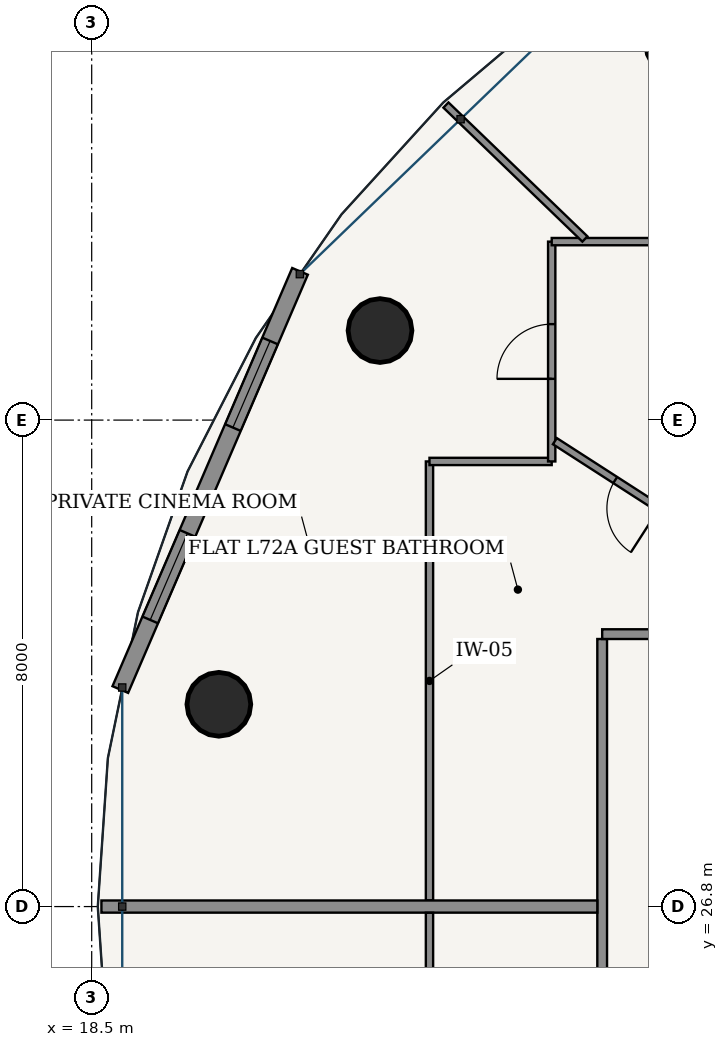
"""IFC4 building model, lengths in metres.
Left out: names, types, materials, properties, quantities, classifications, styles, units other than length and angle.
Written with IfcOpenShell. Run it as: python <this file> out.ifc"""

import sys

from ifc_helpers import new_model, si_unit, direction, frame, frame_2d, origin, origin_2d, place, context, subcontext, project, spatial, rectangle, hollow_circle, extrude, source, transform, mapped, element, fill, save


model = new_model("IFC4")
c1 = context("Model", 3, precision=1e-05, world=origin(), true_north=direction((-0.2419218956, 0.970295726276)))
c2 = subcontext(c1, "Body", "Model", "MODEL_VIEW")
j1 = project(units=[si_unit("LENGTHUNIT", "METRE"), si_unit("PLANEANGLEUNIT", "RADIAN")], contexts=[c1])
p1 = place(None, origin())
s1 = spatial("IfcSite", under=j1, at=p1, CompositionType="ELEMENT")
p2 = place(p1, origin())
s2 = spatial("IfcBuilding", under=s1, at=p2, CompositionType="ELEMENT")
p3 = place(p2, frame((0.0, 0.0, 274.45)))
s3 = spatial("IfcBuildingStorey", under=s2, at=p3, CompositionType="ELEMENT", Elevation=274.45)
for number, where, z_axis, x_axis in (
    (1, (28.139, 40.977, 0.0), (0.0, 0.0, 1.0), (1.0, 0.0, 0.0)),
    (2, (23.241, 36.272, 0.0), (0.0, 0.0, 1.0), (1.0, 0.0, 0.0)),
    (3, (20.591, 30.126, 0.0), (0.0, 0.0, 1.0), (1.0, 0.0, 0.0)),
):
    element("IfcColumn", number, at=place(p3, frame(where, z_axis=z_axis, x_axis=x_axis)), inside=s3, PredefinedType="COLUMN", context=c2, shape_type="SweptSolid", body=[
        extrude(hollow_circle(Radius=0.525, WallThickness=0.035, at=origin_2d()), origin(), (0.0, 0.0, 1.0), 3.75),
    ])
p4 = place(p3, frame((21.926, 37.246, 0.0), z_axis=(0.0, 0.0, 1.0), x_axis=(-0.394816612978, -0.918759948037, 0.0)))
e4 = element("IfcWall", 4, at=p4, inside=s3, PredefinedType="SOLIDWALL", context=c2, shape_type="SweptSolid", body=[
    extrude(rectangle(XDim=7.485, YDim=0.28, at=frame_2d((3.743, 0.0))), origin(), (0.0, 0.0, 1.0), 3.49),
])
p5 = place(p4, frame((1.246, 0.0, 0.85)))
e5 = element("IfcOpeningElement", 5, at=p5, cuts=e4, PredefinedType="OPENING", context=c2, shape_type="SweptSolid", body=[
    extrude(rectangle(XDim=1.55, YDim=1.95, at=frame_2d((0.775, 0.975))), frame((0.0, 0.15, 0.0), z_axis=(0.0, -1.0, 0.0), x_axis=(1.0, 0.0, 0.0)), (0.0, 0.0, 1.0), 0.3),
])
p6 = place(p4, frame((4.689, 0.0, 0.85)))
e6 = element("IfcOpeningElement", 6, at=p6, cuts=e4, PredefinedType="OPENING", context=c2, shape_type="SweptSolid", body=[
    extrude(rectangle(XDim=1.55, YDim=1.95, at=frame_2d((0.775, 0.975))), frame((0.0, 0.15, 0.0), z_axis=(0.0, -1.0, 0.0), x_axis=(1.0, 0.0, 0.0)), (0.0, 0.0, 1.0), 0.3),
])
p7 = place(p3, frame((26.895, 17.275, 0.0), z_axis=(0.0, 0.0, 1.0), x_axis=(0.0, 1.0, 0.0)))
e7 = element("IfcWall", 7, at=p7, inside=s3, PredefinedType="PARTITIONING", context=c2, shape_type="SweptSolid", body=[
    extrude(rectangle(XDim=13.925, YDim=0.16, at=frame_2d((6.962, 0.0))), origin(), (0.0, 0.0, 1.0), 3.015),
])
p8 = place(p7, frame((2.735, 0.0, 0.0)))
e8 = element("IfcOpeningElement", 8, at=p8, cuts=e7, PredefinedType="OPENING", context=c2, shape_type="SweptSolid", body=[
    extrude(rectangle(XDim=0.98, YDim=2.2, at=frame_2d((0.49, 1.1))), frame((0.0, 0.09, 0.0), z_axis=(0.0, -1.0, 0.0), x_axis=(1.0, 0.0, 0.0)), (0.0, 0.0, 1.0), 0.18),
])
p9 = place(p3, frame((26.895, 31.28, 0.0), z_axis=(0.0, 0.0, 1.0), x_axis=(1.0, 0.0, 0.0)))
e9 = element("IfcWall", 9, at=p9, inside=s3, PredefinedType="PARTITIONING", context=c2, shape_type="SweptSolid", body=[
    extrude(rectangle(XDim=1.93, YDim=0.16, at=frame_2d((0.965, 0.0))), origin(), (0.0, 0.0, 1.0), 3.49),
])
p10 = place(p3, frame((24.055, 26.902, 0.0), z_axis=(0.0, 0.0, 1.0), x_axis=(0.0, 1.0, 0.0)))
e10 = element("IfcWall", 10, at=p10, inside=s3, PredefinedType="PARTITIONING", context=c2, shape_type="SweptSolid", body=[
    extrude(rectangle(XDim=7.218, YDim=0.12, at=frame_2d((3.609, 0.0))), origin(), (0.0, 0.0, 1.0), 3.015),
])
p11 = place(p3, frame((24.055, 34.12, 0.0), z_axis=(0.0, 0.0, 1.0), x_axis=(1.0, 0.0, 0.0)))
e11 = element("IfcWall", 11, at=p11, inside=s3, PredefinedType="PARTITIONING", context=c2, shape_type="SweptSolid", body=[
    extrude(rectangle(XDim=2.01, YDim=0.12, at=frame_2d((1.005, 0.0))), origin(), (0.0, 0.0, 1.0), 3.209),
])
p12 = place(p3, frame((26.065, 34.12, 0.0), z_axis=(0.0, 0.0, 1.0), x_axis=(0.0, 1.0, 0.0)))
e12 = element("IfcWall", 12, at=p12, inside=s3, PredefinedType="PARTITIONING", context=c2, shape_type="SweptSolid", body=[
    extrude(rectangle(XDim=3.615, YDim=0.12, at=frame_2d((1.808, 0.0))), origin(), (0.0, 0.0, 1.0), 3.015),
])
p13 = place(p12, frame((1.358, 0.0, 0.0)))
e13 = element("IfcOpeningElement", 13, at=p13, cuts=e12, PredefinedType="OPENING", context=c2, shape_type="SweptSolid", body=[
    extrude(rectangle(XDim=0.9, YDim=2.15, at=frame_2d((0.45, 1.075))), frame((0.0, 0.07, 0.0), z_axis=(0.0, -1.0, 0.0), x_axis=(1.0, 0.0, 0.0)), (0.0, 0.0, 1.0), 0.14),
])
p14 = place(p3, frame((26.065, 37.735, 0.0), z_axis=(0.0, 0.0, 1.0), x_axis=(1.0, 0.0, 0.0)))
e14 = element("IfcWall", 14, at=p14, inside=s3, PredefinedType="PARTITIONING", context=c2, shape_type="SweptSolid", body=[
    extrude(rectangle(XDim=23.87, YDim=0.12, at=frame_2d((11.935, 0.0))), origin(), (0.0, 0.0, 1.0), 3.015),
])
p15 = place(p14, frame((18.46, 0.0, 0.0)))
e15 = element("IfcOpeningElement", 15, at=p15, cuts=e14, PredefinedType="OPENING", context=c2, shape_type="SweptSolid", body=[
    extrude(rectangle(XDim=0.9, YDim=2.15, at=frame_2d((0.45, 1.075))), frame((0.0, 0.07, 0.0), z_axis=(0.0, -1.0, 0.0), x_axis=(1.0, 0.0, 0.0)), (0.0, 0.0, 1.0), 0.14),
])
p16 = place(p14, frame((3.144, 0.0, 0.0)))
e16 = element("IfcOpeningElement", 16, at=p16, cuts=e14, PredefinedType="OPENING", context=c2, shape_type="SweptSolid", body=[
    extrude(rectangle(XDim=0.9, YDim=2.15, at=frame_2d((0.45, 1.075))), frame((0.0, 0.07, 0.0), z_axis=(0.0, -1.0, 0.0), x_axis=(1.0, 0.0, 0.0)), (0.0, 0.0, 1.0), 0.14),
])
p17 = place(p3, frame((26.611, 37.778, 0.0), z_axis=(0.0, 0.0, 1.0), x_axis=(-0.719985652574, 0.693988948102, 0.0)))
e17 = element("IfcWall", 17, at=p17, inside=s3, PredefinedType="PARTITIONING", context=c2, shape_type="SweptSolid", body=[
    extrude(rectangle(XDim=3.174, YDim=0.12, at=frame_2d((1.587, 0.0))), origin(), (0.0, 0.0, 1.0), 3.121),
])
p18 = place(p3, frame((28.825, 32.709, 0.0), z_axis=(0.0, 0.0, 1.0), x_axis=(-0.840692964871, 0.541512085568, 0.0)))
e18 = element("IfcWall", 18, at=p18, inside=s3, PredefinedType="PARTITIONING", context=c2, shape_type="SweptSolid", body=[
    extrude(rectangle(XDim=3.221, YDim=0.12, at=frame_2d((1.61, 0.0))), origin(), (0.0, 0.0, 1.0), 3.015),
])
p19 = place(p18, frame((1.18, 0.0, 0.0)))
e19 = element("IfcOpeningElement", 19, at=p19, cuts=e18, PredefinedType="OPENING", context=c2, shape_type="SweptSolid", body=[
    extrude(rectangle(XDim=0.86, YDim=2.15, at=frame_2d((0.43, 1.075))), frame((0.0, 0.07, 0.0), z_axis=(0.0, -1.0, 0.0), x_axis=(1.0, 0.0, 0.0)), (0.0, 0.0, 1.0), 0.14),
])
p20 = place(p3, frame((26.815, 26.8, 0.0), z_axis=(0.0, 0.0, 1.0), x_axis=(-1.0, 0.0, 0.0)))
e20 = element("IfcWall", 20, at=p20, inside=s3, PredefinedType="PARTITIONING", context=c2, shape_type="SweptSolid", body=[
    extrude(rectangle(XDim=8.155, YDim=0.2, at=frame_2d((4.078, 0.0))), origin(), (0.0, 0.0, 1.0), 3.121),
])
p21 = place(p3, frame((24.055, 14.355, 0.0), z_axis=(0.0, 0.0, 1.0), x_axis=(0.0, 1.0, 0.0)))
e21 = element("IfcWall", 21, at=p21, inside=s3, PredefinedType="PARTITIONING", context=c2, shape_type="SweptSolid", body=[
    extrude(rectangle(XDim=12.343, YDim=0.12, at=frame_2d((6.171, 0.0))), origin(), (0.0, 0.0, 1.0), 3.015),
])
p22 = place(p21, frame((5.442, 0.0, 0.0)))
e22 = element("IfcOpeningElement", 22, at=p22, cuts=e21, PredefinedType="OPENING", context=c2, shape_type="SweptSolid", body=[
    extrude(rectangle(XDim=0.9, YDim=2.15, at=frame_2d((0.45, 1.075))), frame((0.0, 0.07, 0.0), z_axis=(0.0, -1.0, 0.0), x_axis=(1.0, 0.0, 0.0)), (0.0, 0.0, 1.0), 0.14),
])
m1 = source(origin(), c2, "Body", "SweptSolid", [
    extrude(rectangle(XDim=1.55, YDim=1.95, at=frame_2d((0.775, 0.975))), frame((0.0, 0.03, 0.0), z_axis=(0.0, -1.0, 0.0), x_axis=(1.0, 0.0, 0.0)), (0.0, 0.0, 1.0), 0.06),
])
p23 = place(p5, origin())
e23 = element("IfcWindow", 23, at=p23, inside=s3, PartitioningType="SINGLE_PANEL", PredefinedType="WINDOW", context=c2, shape_type="MappedRepresentation", body=[
    mapped(m1, transform((0.0, 0.0, 0.0), scale=1.0)),
])
fill(e5, e23)
p24 = place(p6, origin())
e24 = element("IfcWindow", 24, at=p24, inside=s3, PartitioningType="SINGLE_PANEL", PredefinedType="WINDOW", context=c2, shape_type="MappedRepresentation", body=[
    mapped(m1, transform((0.0, 0.0, 0.0), scale=1.0)),
])
fill(e6, e24)
m2 = source(origin(), c2, "Body", "SweptSolid", [
    extrude(rectangle(XDim=0.86, YDim=2.15, at=frame_2d((0.43, 1.075))), frame((0.0, 0.025, 0.0), z_axis=(0.0, -1.0, 0.0), x_axis=(1.0, 0.0, 0.0)), (0.0, 0.0, 1.0), 0.05),
])
p25 = place(p19, origin())
e25 = element("IfcDoor", 25, at=p25, inside=s3, OperationType="SINGLE_SWING_LEFT", PredefinedType="DOOR", context=c2, shape_type="MappedRepresentation", body=[
    mapped(m2, transform((0.0, 0.0, 0.0), scale=1.0)),
])
fill(e19, e25)
m3 = source(origin(), c2, "Body", "SweptSolid", [
    extrude(rectangle(XDim=0.9, YDim=2.15, at=frame_2d((0.45, 1.075))), frame((0.0, 0.025, 0.0), z_axis=(0.0, -1.0, 0.0), x_axis=(1.0, 0.0, 0.0)), (0.0, 0.0, 1.0), 0.05),
])
p26 = place(p13, origin())
e26 = element("IfcDoor", 26, at=p26, inside=s3, OperationType="SINGLE_SWING_LEFT", PredefinedType="DOOR", context=c2, shape_type="MappedRepresentation", body=[
    mapped(m3, transform((0.0, 0.0, 0.0), scale=1.0)),
])
fill(e13, e26)
save(model, sys.argv[1])
